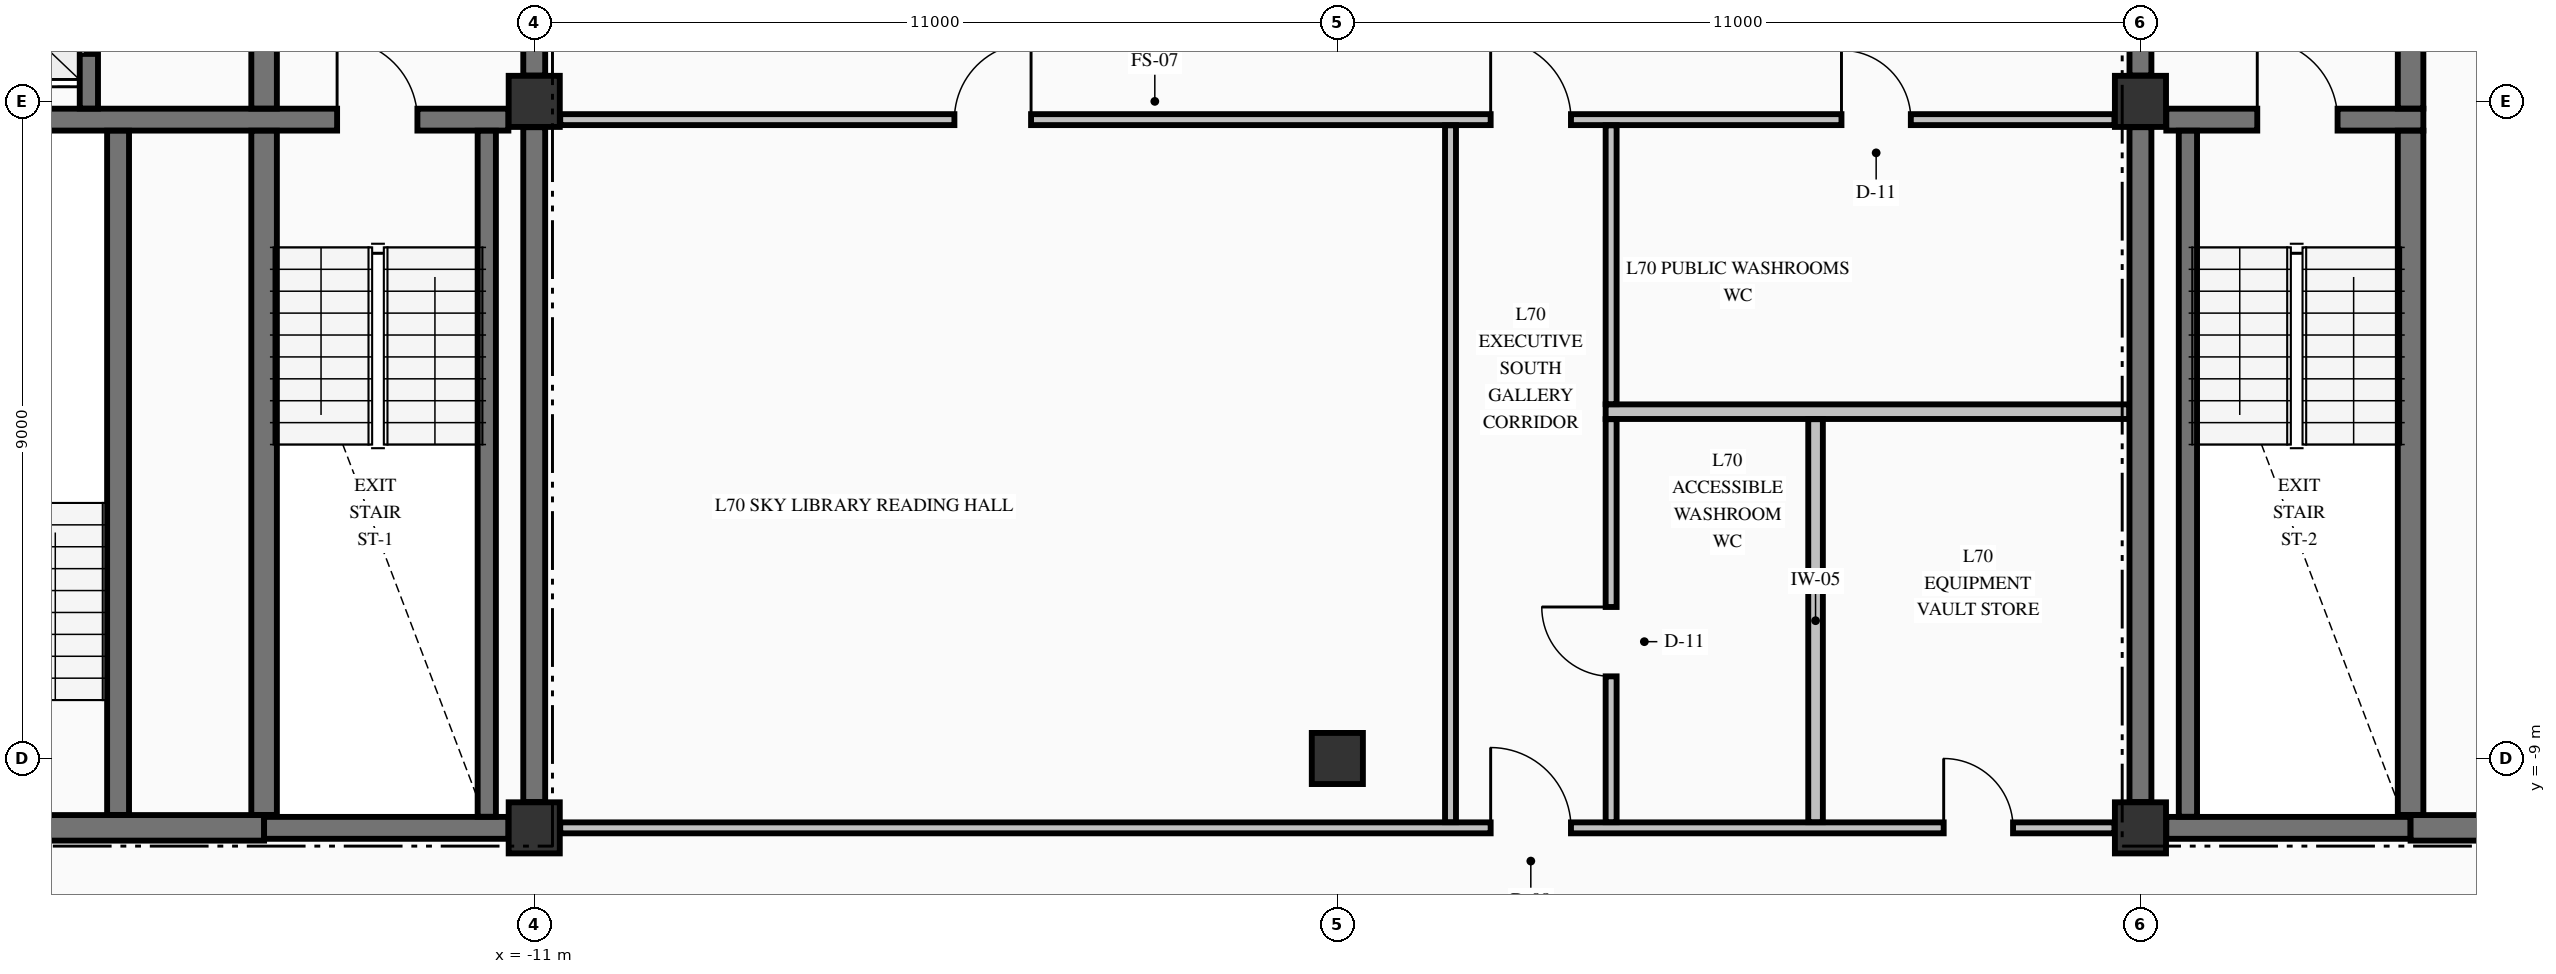
"""IFC4 building model, lengths in metres.
Left out: names, types, materials, properties, quantities, classifications, styles, units other than length and angle.
Written with IfcOpenShell. Run it as: python <this file> out.ifc"""

import sys

from ifc_helpers import new_model, si_unit, direction, frame, frame_2d, origin, origin_2d, place, context, subcontext, project, spatial, rectangle, extrude, element, fill, save


model = new_model("IFC4")
c1 = context("Model", 3, precision=1e-05, world=origin(), true_north=direction((0.0, 1.0)))
c2 = subcontext(c1, "Body", "Model", "MODEL_VIEW")
j1 = project(units=[si_unit("LENGTHUNIT", "METRE"), si_unit("PLANEANGLEUNIT", "RADIAN")], contexts=[c1])
p1 = place(None, origin())
s1 = spatial("IfcSite", under=j1, at=p1, CompositionType="ELEMENT")
p2 = place(p1, origin())
s2 = spatial("IfcBuilding", under=s1, at=p2, CompositionType="ELEMENT")
p3 = place(p2, frame((0.0, 0.0, 264.12)))
s3 = spatial("IfcBuildingStorey", under=s2, at=p3, CompositionType="ELEMENT", Elevation=264.12)
for number, where, z_axis, x_axis in (
    (1, (-11.0, -9.95, -0.25), (0.0, 0.0, 1.0), (1.0, 0.0, 0.0)),
    (2, (-11.0, 0.0, -0.25), (0.0, 0.0, 1.0), (1.0, 0.0, 0.0)),
    (3, (11.0, -9.95, -0.25), (0.0, 0.0, 1.0), (1.0, 0.0, 0.0)),
    (4, (11.0, 0.0, -0.25), (0.0, 0.0, 1.0), (1.0, 0.0, 0.0)),
    (5, (0.0, -9.0, -0.25), (0.0, 0.0, 1.0), (1.0, 0.0, 0.0)),
):
    element("IfcColumn", number, at=place(p3, frame(where, z_axis=z_axis, x_axis=x_axis)), inside=s3, PredefinedType="COLUMN", context=c2, shape_type="SweptSolid", body=[
        extrude(rectangle(XDim=0.7, YDim=0.7, at=origin_2d()), origin(), (0.0, 0.0, 1.0), 3.23),
    ])
p4 = place(p3, frame((-19.646, -9.95, 0.0), z_axis=(0.0, 0.0, 1.0), x_axis=(1.0, 0.0, 0.0)))
e6 = element("IfcWall", 6, at=p4, inside=s3, PredefinedType="SHEAR", context=c2, shape_type="SweptSolid", body=[
    extrude(rectangle(XDim=4.946, YDim=0.35, at=frame_2d((2.473, 0.0))), origin(), (0.0, 0.0, 1.0), 2.98),
])
p5 = place(p4, frame((0.821, 0.0, 0.0)))
e7 = element("IfcOpeningElement", 7, at=p5, cuts=e6, PredefinedType="OPENING", context=c2, shape_type="SweptSolid", body=[
    extrude(rectangle(XDim=1.05, YDim=2.15, at=frame_2d((0.525, 1.075))), frame((0.0, 0.185, 0.0), z_axis=(0.0, -1.0, 0.0), x_axis=(1.0, 0.0, 0.0)), (0.0, 0.0, 1.0), 0.37),
])
for number, where, z_axis, x_axis in (
    (8, (-14.7, -9.95, 0.0), (0.0, 0.0, 1.0), (1.0, 0.0, 0.0)),
    (9, (11.354, -9.95, 0.0), (0.0, 0.0, 1.0), (1.0, 0.0, 0.0)),
):
    element("IfcWall", number, at=place(p3, frame(where, z_axis=z_axis, x_axis=x_axis)), inside=s3, PredefinedType="SHEAR", context=c2, shape_type="SweptSolid", body=[
        extrude(rectangle(XDim=3.346, YDim=0.3, at=frame_2d((1.673, 0.0))), origin(), (0.0, 0.0, 1.0), 2.98),
    ])
p6 = place(p3, frame((14.7, -9.95, 0.0), z_axis=(0.0, 0.0, 1.0), x_axis=(1.0, 0.0, 0.0)))
e10 = element("IfcWall", 10, at=p6, inside=s3, PredefinedType="SHEAR", context=c2, shape_type="SweptSolid", body=[
    extrude(rectangle(XDim=4.946, YDim=0.35, at=frame_2d((2.473, 0.0))), origin(), (0.0, 0.0, 1.0), 2.98),
])
p7 = place(p6, frame((2.125, 0.0, 0.0)))
e11 = element("IfcOpeningElement", 11, at=p7, cuts=e10, PredefinedType="OPENING", context=c2, shape_type="SweptSolid", body=[
    extrude(rectangle(XDim=1.05, YDim=2.15, at=frame_2d((0.525, 1.075))), frame((0.0, 0.185, 0.0), z_axis=(0.0, -1.0, 0.0), x_axis=(1.0, 0.0, 0.0)), (0.0, 0.0, 1.0), 0.37),
])
p8 = place(p3, frame((-19.646, -0.25, 0.0), z_axis=(0.0, 0.0, 1.0), x_axis=(1.0, 0.0, 0.0)))
e12 = element("IfcWall", 12, at=p8, inside=s3, PredefinedType="SHEAR", context=c2, shape_type="SweptSolid", body=[
    extrude(rectangle(XDim=8.292, YDim=0.3, at=frame_2d((4.146, 0.0))), origin(), (0.0, 0.0, 1.0), 2.98),
])
p9 = place(p8, frame((5.946, 0.0, 0.0)))
e13 = element("IfcOpeningElement", 13, at=p9, cuts=e12, PredefinedType="OPENING", context=c2, shape_type="SweptSolid", body=[
    extrude(rectangle(XDim=1.1, YDim=2.15, at=frame_2d((0.55, 1.075))), frame((0.0, 0.16, 0.0), z_axis=(0.0, -1.0, 0.0), x_axis=(1.0, 0.0, 0.0)), (0.0, 0.0, 1.0), 0.32),
])
p10 = place(p3, frame((11.354, -0.25, 0.0), z_axis=(0.0, 0.0, 1.0), x_axis=(1.0, 0.0, 0.0)))
e14 = element("IfcWall", 14, at=p10, inside=s3, PredefinedType="SHEAR", context=c2, shape_type="SweptSolid", body=[
    extrude(rectangle(XDim=3.521, YDim=0.3, at=frame_2d((1.76, 0.0))), origin(), (0.0, 0.0, 1.0), 2.98),
])
p11 = place(p10, frame((1.246, 0.0, 0.0)))
e15 = element("IfcOpeningElement", 15, at=p11, cuts=e14, PredefinedType="OPENING", context=c2, shape_type="SweptSolid", body=[
    extrude(rectangle(XDim=1.1, YDim=2.15, at=frame_2d((0.55, 1.075))), frame((0.0, 0.16, 0.0), z_axis=(0.0, -1.0, 0.0), x_axis=(1.0, 0.0, 0.0)), (0.0, 0.0, 1.0), 0.32),
])
p12 = place(p3, frame((-10.644, -9.95, 0.0), z_axis=(0.0, 0.0, 1.0), x_axis=(1.0, 0.0, 0.0)))
e16 = element("IfcWall", 16, at=p12, inside=s3, PredefinedType="PARTITIONING", context=c2, shape_type="SweptSolid", body=[
    extrude(rectangle(XDim=21.288, YDim=0.15, at=frame_2d((10.644, 0.0))), origin(), (0.0, 0.0, 1.0), 2.98),
])
p13 = place(p12, frame((12.744, 0.0, 0.0)))
e17 = element("IfcOpeningElement", 17, at=p13, cuts=e16, PredefinedType="OPENING", context=c2, shape_type="SweptSolid", body=[
    extrude(rectangle(XDim=1.1, YDim=2.15, at=frame_2d((0.55, 1.075))), frame((0.0, 0.085, 0.0), z_axis=(0.0, -1.0, 0.0), x_axis=(1.0, 0.0, 0.0)), (0.0, 0.0, 1.0), 0.17),
])
p14 = place(p12, frame((18.949, 0.0, 0.0)))
e18 = element("IfcOpeningElement", 18, at=p14, cuts=e16, PredefinedType="OPENING", context=c2, shape_type="SweptSolid", body=[
    extrude(rectangle(XDim=0.95, YDim=2.15, at=frame_2d((0.475, 1.075))), frame((0.0, 0.085, 0.0), z_axis=(0.0, -1.0, 0.0), x_axis=(1.0, 0.0, 0.0)), (0.0, 0.0, 1.0), 0.17),
])
p15 = place(p3, frame((3.675, -4.25, 0.0), z_axis=(0.0, 0.0, 1.0), x_axis=(1.0, 0.0, 0.0)))
e19 = element("IfcWall", 19, at=p15, inside=s3, PredefinedType="PARTITIONING", context=c2, shape_type="SweptSolid", body=[
    extrude(rectangle(XDim=7.172, YDim=0.2, at=frame_2d((3.586, 0.0))), origin(), (0.0, 0.0, 1.0), 2.98),
])
p16 = place(p3, frame((-10.644, -0.25, 0.0), z_axis=(0.0, 0.0, 1.0), x_axis=(1.0, 0.0, 0.0)))
e20 = element("IfcWall", 20, at=p16, inside=s3, PredefinedType="PARTITIONING", context=c2, shape_type="SweptSolid", body=[
    extrude(rectangle(XDim=21.288, YDim=0.15, at=frame_2d((10.644, 0.0))), origin(), (0.0, 0.0, 1.0), 2.98),
])
p17 = place(p16, frame((12.744, 0.0, 0.0)))
e21 = element("IfcOpeningElement", 21, at=p17, cuts=e20, PredefinedType="OPENING", context=c2, shape_type="SweptSolid", body=[
    extrude(rectangle(XDim=1.1, YDim=2.15, at=frame_2d((0.55, 1.075))), frame((0.0, 0.085, 0.0), z_axis=(0.0, -1.0, 0.0), x_axis=(1.0, 0.0, 0.0)), (0.0, 0.0, 1.0), 0.17),
])
p18 = place(p16, frame((5.399, 0.0, 0.0)))
e22 = element("IfcOpeningElement", 22, at=p18, cuts=e20, PredefinedType="OPENING", context=c2, shape_type="SweptSolid", body=[
    extrude(rectangle(XDim=1.05, YDim=2.15, at=frame_2d((0.525, 1.075))), frame((0.0, 0.085, 0.0), z_axis=(0.0, -1.0, 0.0), x_axis=(1.0, 0.0, 0.0)), (0.0, 0.0, 1.0), 0.17),
])
p19 = place(p16, frame((17.549, 0.0, 0.0)))
e23 = element("IfcOpeningElement", 23, at=p19, cuts=e20, PredefinedType="OPENING", context=c2, shape_type="SweptSolid", body=[
    extrude(rectangle(XDim=0.95, YDim=2.15, at=frame_2d((0.475, 1.075))), frame((0.0, 0.085, 0.0), z_axis=(0.0, -1.0, 0.0), x_axis=(1.0, 0.0, 0.0)), (0.0, 0.0, 1.0), 0.17),
])
p20 = place(p3, frame((-17.1, -0.098, 0.0), z_axis=(0.0, 0.0, 1.0), x_axis=(0.0, 1.0, 0.0)))
e24 = element("IfcWall", 24, at=p20, inside=s3, PredefinedType="SOLIDWALL", context=c2, shape_type="SweptSolid", body=[
    extrude(rectangle(XDim=2.621, YDim=0.25, at=frame_2d((1.311, 0.0))), origin(), (0.0, 0.0, 1.0), 2.98),
])
p21 = place(p20, frame((0.748, 0.0, 0.0)))
e25 = element("IfcOpeningElement", 25, at=p21, cuts=e24, PredefinedType="OPENING", context=c2, shape_type="SweptSolid", body=[
    extrude(rectangle(XDim=1.1, YDim=2.2, at=frame_2d((0.55, 1.1))), frame((0.0, 0.135, 0.0), z_axis=(0.0, -1.0, 0.0), x_axis=(1.0, 0.0, 0.0)), (0.0, 0.0, 1.0), 0.27),
])
p22 = place(p3, frame((-16.7, -9.773, 0.0), z_axis=(0.0, 0.0, 1.0), x_axis=(0.0, 1.0, 0.0)))
e26 = element("IfcWall", 26, at=p22, inside=s3, PredefinedType="SHEAR", context=c2, shape_type="SweptSolid", body=[
    extrude(rectangle(XDim=9.371, YDim=0.3, at=frame_2d((4.686, 0.0))), origin(), (0.0, 0.0, 1.0), 2.98),
])
p23 = place(p3, frame((-14.7, -9.773, 0.0), z_axis=(0.0, 0.0, 1.0), x_axis=(0.0, 1.0, 0.0)))
e27 = element("IfcWall", 27, at=p23, inside=s3, PredefinedType="SHEAR", context=c2, shape_type="SweptSolid", body=[
    extrude(rectangle(XDim=9.371, YDim=0.35, at=frame_2d((4.686, 0.0))), origin(), (0.0, 0.0, 1.0), 2.98),
])
p24 = place(p3, frame((-14.7, -0.098, 0.0), z_axis=(0.0, 0.0, 1.0), x_axis=(0.0, 1.0, 0.0)))
e28 = element("IfcWall", 28, at=p24, inside=s3, PredefinedType="SHEAR", context=c2, shape_type="SweptSolid", body=[
    extrude(rectangle(XDim=2.846, YDim=0.35, at=frame_2d((1.423, 0.0))), origin(), (0.0, 0.0, 1.0), 2.98),
])
p25 = place(p3, frame((-11.65, -9.798, 0.0), z_axis=(0.0, 0.0, 1.0), x_axis=(0.0, 1.0, 0.0)))
e29 = element("IfcWall", 29, at=p25, inside=s3, PredefinedType="SOLIDWALL", context=c2, shape_type="SweptSolid", body=[
    extrude(rectangle(XDim=9.396, YDim=0.25, at=frame_2d((4.698, 0.0))), origin(), (0.0, 0.0, 1.0), 2.98),
])
p26 = place(p3, frame((-11.0, -9.596, 0.0), z_axis=(0.0, 0.0, 1.0), x_axis=(0.0, 1.0, 0.0)))
e30 = element("IfcWall", 30, at=p26, inside=s3, PredefinedType="SHEAR", context=c2, shape_type="SweptSolid", body=[
    extrude(rectangle(XDim=9.242, YDim=0.3, at=frame_2d((4.621, 0.0))), origin(), (0.0, 0.0, 1.0), 2.98),
])
p27 = place(p3, frame((-11.0, 0.354, 0.0), z_axis=(0.0, 0.0, 1.0), x_axis=(0.0, 1.0, 0.0)))
e31 = element("IfcWall", 31, at=p27, inside=s3, PredefinedType="SHEAR", context=c2, shape_type="SweptSolid", body=[
    extrude(rectangle(XDim=2.394, YDim=0.3, at=frame_2d((1.197, 0.0))), origin(), (0.0, 0.0, 1.0), 2.98),
])
p28 = place(p27, frame((0.746, 0.0, 0.0)))
e32 = element("IfcOpeningElement", 32, at=p28, cuts=e31, PredefinedType="OPENING", context=c2, shape_type="SweptSolid", body=[
    extrude(rectangle(XDim=1.1, YDim=2.15, at=frame_2d((0.55, 1.075))), frame((0.0, 0.16, 0.0), z_axis=(0.0, -1.0, 0.0), x_axis=(1.0, 0.0, 0.0)), (0.0, 0.0, 1.0), 0.32),
])
p29 = place(p3, frame((11.0, -9.596, 0.0), z_axis=(0.0, 0.0, 1.0), x_axis=(0.0, 1.0, 0.0)))
e33 = element("IfcWall", 33, at=p29, inside=s3, PredefinedType="SHEAR", context=c2, shape_type="SweptSolid", body=[
    extrude(rectangle(XDim=9.242, YDim=0.3, at=frame_2d((4.621, 0.0))), origin(), (0.0, 0.0, 1.0), 2.98),
])
p30 = place(p3, frame((11.0, 0.354, 0.0), z_axis=(0.0, 0.0, 1.0), x_axis=(0.0, 1.0, 0.0)))
e34 = element("IfcWall", 34, at=p30, inside=s3, PredefinedType="SHEAR", context=c2, shape_type="SweptSolid", body=[
    extrude(rectangle(XDim=2.394, YDim=0.3, at=frame_2d((1.197, 0.0))), origin(), (0.0, 0.0, 1.0), 2.98),
])
p31 = place(p30, frame((0.746, 0.0, 0.0)))
e35 = element("IfcOpeningElement", 35, at=p31, cuts=e34, PredefinedType="OPENING", context=c2, shape_type="SweptSolid", body=[
    extrude(rectangle(XDim=1.1, YDim=2.15, at=frame_2d((0.55, 1.075))), frame((0.0, 0.16, 0.0), z_axis=(0.0, -1.0, 0.0), x_axis=(1.0, 0.0, 0.0)), (0.0, 0.0, 1.0), 0.32),
])
p32 = place(p3, frame((11.65, -9.798, 0.0), z_axis=(0.0, 0.0, 1.0), x_axis=(0.0, 1.0, 0.0)))
e36 = element("IfcWall", 36, at=p32, inside=s3, PredefinedType="SOLIDWALL", context=c2, shape_type="SweptSolid", body=[
    extrude(rectangle(XDim=9.396, YDim=0.25, at=frame_2d((4.698, 0.0))), origin(), (0.0, 0.0, 1.0), 2.98),
])
p33 = place(p3, frame((14.7, -9.773, 0.0), z_axis=(0.0, 0.0, 1.0), x_axis=(0.0, 1.0, 0.0)))
e37 = element("IfcWall", 37, at=p33, inside=s3, PredefinedType="SHEAR", context=c2, shape_type="SweptSolid", body=[
    extrude(rectangle(XDim=9.371, YDim=0.35, at=frame_2d((4.686, 0.0))), origin(), (0.0, 0.0, 1.0), 2.98),
])
p34 = place(p3, frame((14.7, -0.098, 0.0), z_axis=(0.0, 0.0, 1.0), x_axis=(0.0, 1.0, 0.0)))
e38 = element("IfcWall", 38, at=p34, inside=s3, PredefinedType="SHEAR", context=c2, shape_type="SweptSolid", body=[
    extrude(rectangle(XDim=2.846, YDim=0.35, at=frame_2d((1.423, 0.0))), origin(), (0.0, 0.0, 1.0), 2.98),
])
p35 = place(p3, frame((1.55, -9.872, 0.0), z_axis=(0.0, 0.0, 1.0), x_axis=(0.0, 1.0, 0.0)))
e39 = element("IfcWall", 39, at=p35, inside=s3, PredefinedType="PARTITIONING", context=c2, shape_type="SweptSolid", body=[
    extrude(rectangle(XDim=9.544, YDim=0.15, at=frame_2d((4.772, 0.0))), origin(), (0.0, 0.0, 1.0), 2.98),
])
p36 = place(p3, frame((3.75, -9.872, 0.0), z_axis=(0.0, 0.0, 1.0), x_axis=(0.0, 1.0, 0.0)))
e40 = element("IfcWall", 40, at=p36, inside=s3, PredefinedType="PARTITIONING", context=c2, shape_type="SweptSolid", body=[
    extrude(rectangle(XDim=5.519, YDim=0.15, at=frame_2d((2.76, 0.0))), origin(), (0.0, 0.0, 1.0), 2.98),
])
p37 = place(p36, frame((1.997, 0.0, 0.0)))
e41 = element("IfcOpeningElement", 41, at=p37, cuts=e40, PredefinedType="OPENING", context=c2, shape_type="SweptSolid", body=[
    extrude(rectangle(XDim=0.95, YDim=2.15, at=frame_2d((0.475, 1.075))), frame((0.0, 0.085, 0.0), z_axis=(0.0, -1.0, 0.0), x_axis=(1.0, 0.0, 0.0)), (0.0, 0.0, 1.0), 0.17),
])
p38 = place(p3, frame((3.75, -4.147, 0.0), z_axis=(0.0, 0.0, 1.0), x_axis=(0.0, 1.0, 0.0)))
e42 = element("IfcWall", 42, at=p38, inside=s3, PredefinedType="PARTITIONING", context=c2, shape_type="SweptSolid", body=[
    extrude(rectangle(XDim=3.819, YDim=0.15, at=frame_2d((1.91, 0.0))), origin(), (0.0, 0.0, 1.0), 2.98),
])
p39 = place(p3, frame((6.55, -9.872, 0.0), z_axis=(0.0, 0.0, 1.0), x_axis=(0.0, 1.0, 0.0)))
e43 = element("IfcWall", 43, at=p39, inside=s3, PredefinedType="PARTITIONING", context=c2, shape_type="SweptSolid", body=[
    extrude(rectangle(XDim=5.519, YDim=0.2, at=frame_2d((2.76, 0.0))), origin(), (0.0, 0.0, 1.0), 2.98),
])
p40 = place(p9, origin())
e44 = element("IfcDoor", 44, at=p40, inside=s3, OperationType="SINGLE_SWING_LEFT", PredefinedType="DOOR", context=c2, shape_type="SweptSolid", body=[
    extrude(rectangle(XDim=1.1, YDim=2.15, at=frame_2d((0.55, 1.075))), frame((0.0, 0.025, 0.0), z_axis=(0.0, -1.0, 0.0), x_axis=(1.0, 0.0, 0.0)), (0.0, 0.0, 1.0), 0.05),
])
fill(e13, e44)
p41 = place(p11, origin())
e45 = element("IfcDoor", 45, at=p41, inside=s3, OperationType="SINGLE_SWING_LEFT", PredefinedType="DOOR", context=c2, shape_type="SweptSolid", body=[
    extrude(rectangle(XDim=1.1, YDim=2.15, at=frame_2d((0.55, 1.075))), frame((0.0, 0.025, 0.0), z_axis=(0.0, -1.0, 0.0), x_axis=(1.0, 0.0, 0.0)), (0.0, 0.0, 1.0), 0.05),
])
fill(e15, e45)
p42 = place(p21, origin())
e46 = element("IfcDoor", 46, at=p42, inside=s3, OperationType="SLIDING_TO_LEFT", PredefinedType="DOOR", context=c2, shape_type="SweptSolid", body=[
    extrude(rectangle(XDim=1.1, YDim=2.2, at=frame_2d((0.55, 1.1))), frame((0.0, 0.025, 0.0), z_axis=(0.0, -1.0, 0.0), x_axis=(1.0, 0.0, 0.0)), (0.0, 0.0, 1.0), 0.05),
])
fill(e25, e46)
p43 = place(p13, origin())
e47 = element("IfcDoor", 47, at=p43, inside=s3, OperationType="SINGLE_SWING_LEFT", PredefinedType="DOOR", context=c2, shape_type="SweptSolid", body=[
    extrude(rectangle(XDim=1.1, YDim=2.15, at=frame_2d((0.55, 1.075))), frame((0.0, 0.025, 0.0), z_axis=(0.0, -1.0, 0.0), x_axis=(1.0, 0.0, 0.0)), (0.0, 0.0, 1.0), 0.05),
])
fill(e17, e47)
p44 = place(p17, origin())
e48 = element("IfcDoor", 48, at=p44, inside=s3, OperationType="SINGLE_SWING_LEFT", PredefinedType="DOOR", context=c2, shape_type="SweptSolid", body=[
    extrude(rectangle(XDim=1.1, YDim=2.15, at=frame_2d((0.55, 1.075))), frame((0.0, 0.025, 0.0), z_axis=(0.0, -1.0, 0.0), x_axis=(1.0, 0.0, 0.0)), (0.0, 0.0, 1.0), 0.05),
])
fill(e21, e48)
p45 = place(p18, origin())
e49 = element("IfcDoor", 49, at=p45, inside=s3, OperationType="SINGLE_SWING_RIGHT", PredefinedType="DOOR", context=c2, shape_type="SweptSolid", body=[
    extrude(rectangle(XDim=1.05, YDim=2.15, at=frame_2d((0.525, 1.075))), frame((0.0, 0.025, 0.0), z_axis=(0.0, -1.0, 0.0), x_axis=(1.0, 0.0, 0.0)), (0.0, 0.0, 1.0), 0.05),
])
fill(e22, e49)
p46 = place(p19, origin())
e50 = element("IfcDoor", 50, at=p46, inside=s3, OperationType="SINGLE_SWING_LEFT", PredefinedType="DOOR", context=c2, shape_type="SweptSolid", body=[
    extrude(rectangle(XDim=0.95, YDim=2.15, at=frame_2d((0.475, 1.075))), frame((0.0, 0.025, 0.0), z_axis=(0.0, -1.0, 0.0), x_axis=(1.0, 0.0, 0.0)), (0.0, 0.0, 1.0), 0.05),
])
fill(e23, e50)
p47 = place(p37, origin())
e51 = element("IfcDoor", 51, at=p47, inside=s3, OperationType="SINGLE_SWING_RIGHT", PredefinedType="DOOR", context=c2, shape_type="SweptSolid", body=[
    extrude(rectangle(XDim=0.95, YDim=2.15, at=frame_2d((0.475, 1.075))), frame((0.0, 0.025, 0.0), z_axis=(0.0, -1.0, 0.0), x_axis=(1.0, 0.0, 0.0)), (0.0, 0.0, 1.0), 0.05),
])
fill(e41, e51)
p48 = place(p14, origin())
e52 = element("IfcDoor", 52, at=p48, inside=s3, OperationType="SINGLE_SWING_LEFT", PredefinedType="DOOR", context=c2, shape_type="SweptSolid", body=[
    extrude(rectangle(XDim=0.95, YDim=2.15, at=frame_2d((0.475, 1.075))), frame((0.0, 0.025, 0.0), z_axis=(0.0, -1.0, 0.0), x_axis=(1.0, 0.0, 0.0)), (0.0, 0.0, 1.0), 0.05),
])
fill(e18, e52)
save(model, sys.argv[1])
